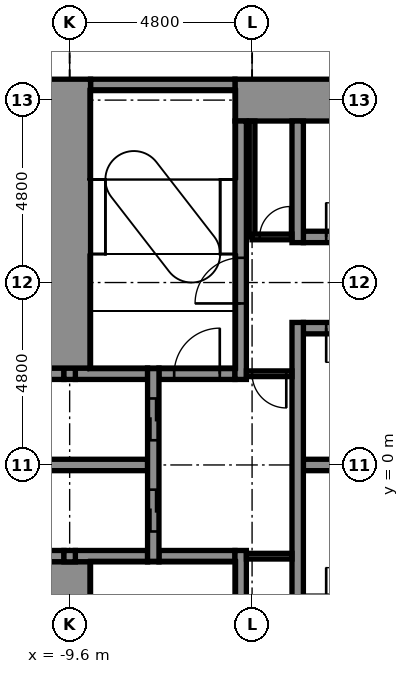
"""IFC4 building model, lengths in metres.
Left out: names, types, materials, properties, quantities, classifications, styles, units other than length and angle.
Written with IfcOpenShell. Run it as: python <this file> out.ifc"""

import sys

from ifc_helpers import new_model, si_unit, direction, frame, frame_2d, origin, place, context, subcontext, project, spatial, rectangle, extrude, element, fill, save


model = new_model("IFC4")
c1 = context("Model", 3, precision=1e-05, world=origin(), true_north=direction((0.0, 1.0)))
c2 = subcontext(c1, "Body", "Model", "MODEL_VIEW")
j1 = project(units=[si_unit("LENGTHUNIT", "METRE"), si_unit("PLANEANGLEUNIT", "RADIAN")], contexts=[c1])
p1 = place(None, origin())
s1 = spatial("IfcSite", under=j1, at=p1, CompositionType="ELEMENT")
p2 = place(p1, origin())
s2 = spatial("IfcBuilding", under=s1, at=p2, CompositionType="ELEMENT")
p3 = place(p2, frame((0.0, 0.0, 12.4)))
s3 = spatial("IfcBuildingStorey", under=s2, at=p3, CompositionType="ELEMENT", Elevation=12.4)
p4 = place(p3, frame((-10.85, -2.4, -0.3), z_axis=(0.0, 0.0, 1.0), x_axis=(1.0, 0.0, 0.0)))
e1 = element("IfcWall", 1, at=p4, inside=s3, PredefinedType="STANDARD", context=c2, shape_type="SweptSolid", body=[
    extrude(rectangle(XDim=1.1, YDim=0.3, at=frame_2d((0.55, 0.0))), origin(), (0.0, 0.0, 1.0), 5.05),
])
p5 = place(p3, frame((-9.45, -2.4, -0.3), z_axis=(0.0, 0.0, 1.0), x_axis=(1.0, 0.0, 0.0)))
e2 = element("IfcWall", 2, at=p5, inside=s3, PredefinedType="STANDARD", context=c2, shape_type="SweptSolid", body=[
    extrude(rectangle(XDim=1.9, YDim=0.3, at=frame_2d((0.95, 0.0))), origin(), (0.0, 0.0, 1.0), 5.05),
])
p6 = place(p3, frame((-7.25, -2.4, -0.3), z_axis=(0.0, 0.0, 1.0), x_axis=(1.0, 0.0, 0.0)))
e3 = element("IfcWall", 3, at=p6, inside=s3, PredefinedType="STANDARD", context=c2, shape_type="SweptSolid", body=[
    extrude(rectangle(XDim=2.0, YDim=0.3, at=frame_2d((1.0, 0.0))), origin(), (0.0, 0.0, 1.0), 5.05),
])
p7 = place(p3, frame((-10.85, 0.0, -0.3), z_axis=(0.0, 0.0, 1.0), x_axis=(1.0, 0.0, 0.0)))
e4 = element("IfcWall", 4, at=p7, inside=s3, PredefinedType="STANDARD", context=c2, shape_type="SweptSolid", body=[
    extrude(rectangle(XDim=3.3, YDim=0.3, at=frame_2d((1.65, 0.0))), origin(), (0.0, 0.0, 1.0), 5.05),
])
p8 = place(p3, frame((-3.45, 0.0, -0.3), z_axis=(0.0, 0.0, 1.0), x_axis=(1.0, 0.0, 0.0)))
e5 = element("IfcWall", 5, at=p8, inside=s3, PredefinedType="STANDARD", context=c2, shape_type="SweptSolid", body=[
    extrude(rectangle(XDim=2.1, YDim=0.3, at=frame_2d((1.05, 0.0))), origin(), (0.0, 0.0, 1.0), 5.05),
])
p9 = place(p3, frame((-10.85, 2.4, -0.3), z_axis=(0.0, 0.0, 1.0), x_axis=(1.0, 0.0, 0.0)))
e6 = element("IfcWall", 6, at=p9, inside=s3, PredefinedType="STANDARD", context=c2, shape_type="SweptSolid", body=[
    extrude(rectangle(XDim=1.1, YDim=0.3, at=frame_2d((0.55, 0.0))), origin(), (0.0, 0.0, 1.0), 5.05),
])
p10 = place(p3, frame((-9.45, 2.4, -0.3), z_axis=(0.0, 0.0, 1.0), x_axis=(1.0, 0.0, 0.0)))
e7 = element("IfcWall", 7, at=p10, inside=s3, PredefinedType="STANDARD", context=c2, shape_type="SweptSolid", body=[
    extrude(rectangle(XDim=1.9, YDim=0.3, at=frame_2d((0.95, 0.0))), origin(), (0.0, 0.0, 1.0), 5.05),
])
p11 = place(p3, frame((-7.25, 2.4, -0.3), z_axis=(0.0, 0.0, 1.0), x_axis=(1.0, 0.0, 0.0)))
e8 = element("IfcWall", 8, at=p11, inside=s3, PredefinedType="STANDARD", context=c2, shape_type="SweptSolid", body=[
    extrude(rectangle(XDim=2.0, YDim=0.3, at=frame_2d((1.0, 0.0))), origin(), (0.0, 0.0, 1.0), 5.05),
])
p12 = place(p11, frame((0.4, 0.0, 0.3)))
e9 = element("IfcOpeningElement", 9, at=p12, cuts=e8, PredefinedType="OPENING", context=c2, shape_type="SweptSolid", body=[
    extrude(rectangle(XDim=1.2, YDim=2.1, at=frame_2d((0.6, 1.05))), frame((0.0, 0.16, 0.0), z_axis=(0.0, -1.0, 0.0), x_axis=(1.0, 0.0, 0.0)), (0.0, 0.0, 1.0), 0.32),
])
p13 = place(p3, frame((-3.45, 3.6, -0.3), z_axis=(0.0, 0.0, 1.0), x_axis=(1.0, 0.0, 0.0)))
e10 = element("IfcWall", 10, at=p13, inside=s3, PredefinedType="STANDARD", context=c2, shape_type="SweptSolid", body=[
    extrude(rectangle(XDim=2.1, YDim=0.3, at=frame_2d((1.05, 0.0))), origin(), (0.0, 0.0, 1.0), 5.05),
])
p14 = place(p13, frame((0.6, 0.0, 0.3)))
e11 = element("IfcOpeningElement", 11, at=p14, cuts=e10, PredefinedType="OPENING", context=c2, shape_type="SweptSolid", body=[
    extrude(rectangle(XDim=0.9, YDim=2.1, at=frame_2d((0.45, 1.05))), frame((0.0, 0.16, 0.0), z_axis=(0.0, -1.0, 0.0), x_axis=(1.0, 0.0, 0.0)), (0.0, 0.0, 1.0), 0.32),
])
p15 = place(p3, frame((-3.45, 6.0, -0.3), z_axis=(0.0, 0.0, 1.0), x_axis=(1.0, 0.0, 0.0)))
e12 = element("IfcWall", 12, at=p15, inside=s3, PredefinedType="STANDARD", context=c2, shape_type="SweptSolid", body=[
    extrude(rectangle(XDim=2.1, YDim=0.3, at=frame_2d((1.05, 0.0))), origin(), (0.0, 0.0, 1.0), 5.05),
])
p16 = place(p15, frame((0.6, 0.0, 0.3)))
e13 = element("IfcOpeningElement", 13, at=p16, cuts=e12, PredefinedType="OPENING", context=c2, shape_type="SweptSolid", body=[
    extrude(rectangle(XDim=0.9, YDim=2.1, at=frame_2d((0.45, 1.05))), frame((0.0, 0.16, 0.0), z_axis=(0.0, -1.0, 0.0), x_axis=(1.0, 0.0, 0.0)), (0.0, 0.0, 1.0), 0.32),
])
p17 = place(p3, frame((-5.25, 9.6, -0.3), z_axis=(0.0, 0.0, 1.0), x_axis=(1.0, 0.0, 0.0)))
e14 = element("IfcWall", 14, at=p17, inside=s3, PredefinedType="SHEAR", context=c2, shape_type="SweptSolid", body=[
    extrude(rectangle(XDim=14.3, YDim=1.1, at=frame_2d((7.15, 0.0))), origin(), (0.0, 0.0, 1.0), 5.05),
])
p18 = place(p17, frame((9.35, 0.0, 0.3)))
e15 = element("IfcOpeningElement", 15, at=p18, cuts=e14, PredefinedType="OPENING", context=c2, shape_type="SweptSolid", body=[
    extrude(rectangle(XDim=1.4, YDim=2.1, at=frame_2d((0.7, 1.05))), frame((0.0, 0.56, 0.0), z_axis=(0.0, -1.0, 0.0), x_axis=(1.0, 0.0, 0.0)), (0.0, 0.0, 1.0), 1.12),
])
p19 = place(p3, frame((-9.05, 10.0, -0.3), z_axis=(0.0, 0.0, 1.0), x_axis=(1.0, 0.0, 0.0)))
e16 = element("IfcWall", 16, at=p19, inside=s3, PredefinedType="STANDARD", context=c2, shape_type="SweptSolid", body=[
    extrude(rectangle(XDim=3.8, YDim=0.3, at=frame_2d((1.9, 0.0))), origin(), (0.0, 0.0, 1.0), 5.05),
])
p20 = place(p3, frame((-9.6, -10.15, -0.3), z_axis=(0.0, 0.0, 1.0), x_axis=(0.0, 1.0, 0.0)))
e17 = element("IfcWall", 17, at=p20, inside=s3, PredefinedType="SHEAR", context=c2, shape_type="SweptSolid", body=[
    extrude(rectangle(XDim=7.6, YDim=1.1, at=frame_2d((3.8, 0.0))), origin(), (0.0, 0.0, 1.0), 5.05),
])
for number, where, z_axis, x_axis in (
    (18, (-9.6, -2.55, -0.3), (0.0, 0.0, 1.0), (0.0, 1.0, 0.0)),
    (19, (-9.6, 2.25, -0.3), (0.0, 0.0, 1.0), (0.0, 1.0, 0.0)),
):
    element("IfcWall", number, at=place(p3, frame(where, z_axis=z_axis, x_axis=x_axis)), inside=s3, PredefinedType="STANDARD", context=c2, shape_type="SweptSolid", body=[
        extrude(rectangle(XDim=0.3, YDim=0.3, at=frame_2d((0.15, 0.0))), origin(), (0.0, 0.0, 1.0), 5.05),
    ])
p21 = place(p3, frame((-9.6, 2.55, -0.3), z_axis=(0.0, 0.0, 1.0), x_axis=(0.0, 1.0, 0.0)))
e20 = element("IfcWall", 20, at=p21, inside=s3, PredefinedType="SHEAR", context=c2, shape_type="SweptSolid", body=[
    extrude(rectangle(XDim=7.6, YDim=1.1, at=frame_2d((3.8, 0.0))), origin(), (0.0, 0.0, 1.0), 5.05),
])
p22 = place(p3, frame((-7.4, -2.55, -0.3), z_axis=(0.0, 0.0, 1.0), x_axis=(0.0, 1.0, 0.0)))
e21 = element("IfcWall", 21, at=p22, inside=s3, PredefinedType="STANDARD", context=c2, shape_type="SweptSolid", body=[
    extrude(rectangle(XDim=5.1, YDim=0.3, at=frame_2d((2.55, 0.0))), origin(), (0.0, 0.0, 1.0), 5.05),
])
p23 = place(p22, frame((0.8, 0.0, 0.3)))
e22 = element("IfcOpeningElement", 22, at=p23, cuts=e21, PredefinedType="OPENING", context=c2, shape_type="SweptSolid", body=[
    extrude(rectangle(XDim=1.1, YDim=2.1, at=frame_2d((0.55, 1.05))), frame((0.0, 0.16, 0.0), z_axis=(0.0, -1.0, 0.0), x_axis=(1.0, 0.0, 0.0)), (0.0, 0.0, 1.0), 0.32),
])
p24 = place(p22, frame((3.2, 0.0, 0.3)))
e23 = element("IfcOpeningElement", 23, at=p24, cuts=e21, PredefinedType="OPENING", context=c2, shape_type="SweptSolid", body=[
    extrude(rectangle(XDim=1.1, YDim=2.1, at=frame_2d((0.55, 1.05))), frame((0.0, 0.16, 0.0), z_axis=(0.0, -1.0, 0.0), x_axis=(1.0, 0.0, 0.0)), (0.0, 0.0, 1.0), 0.32),
])
p25 = place(p3, frame((-5.1, -9.05, -0.3), z_axis=(0.0, 0.0, 1.0), x_axis=(0.0, 1.0, 0.0)))
e24 = element("IfcWall", 24, at=p25, inside=s3, PredefinedType="STANDARD", context=c2, shape_type="SweptSolid", body=[
    extrude(rectangle(XDim=6.8, YDim=0.3, at=frame_2d((3.4, 0.0))), origin(), (0.0, 0.0, 1.0), 5.05),
])
p26 = place(p25, frame((3.6, 0.0, 0.3)))
e25 = element("IfcOpeningElement", 25, at=p26, cuts=e24, PredefinedType="OPENING", context=c2, shape_type="SweptSolid", body=[
    extrude(rectangle(XDim=1.2, YDim=2.1, at=frame_2d((0.6, 1.05))), frame((0.0, 0.16, 0.0), z_axis=(0.0, -1.0, 0.0), x_axis=(1.0, 0.0, 0.0)), (0.0, 0.0, 1.0), 0.32),
])
p27 = place(p3, frame((-5.1, 2.25, -0.3), z_axis=(0.0, 0.0, 1.0), x_axis=(0.0, 1.0, 0.0)))
e26 = element("IfcWall", 26, at=p27, inside=s3, PredefinedType="STANDARD", context=c2, shape_type="SweptSolid", body=[
    extrude(rectangle(XDim=6.8, YDim=0.3, at=frame_2d((3.4, 0.0))), origin(), (0.0, 0.0, 1.0), 5.05),
])
p28 = place(p27, frame((2.0, 0.0, 0.3)))
e27 = element("IfcOpeningElement", 27, at=p28, cuts=e26, PredefinedType="OPENING", context=c2, shape_type="SweptSolid", body=[
    extrude(rectangle(XDim=1.2, YDim=2.1, at=frame_2d((0.6, 1.05))), frame((0.0, 0.16, 0.0), z_axis=(0.0, -1.0, 0.0), x_axis=(1.0, 0.0, 0.0)), (0.0, 0.0, 1.0), 0.32),
])
p29 = place(p3, frame((-3.6, -3.75, -0.3), z_axis=(0.0, 0.0, 1.0), x_axis=(0.0, 1.0, 0.0)))
e28 = element("IfcWall", 28, at=p29, inside=s3, PredefinedType="STANDARD", context=c2, shape_type="SweptSolid", body=[
    extrude(rectangle(XDim=7.5, YDim=0.3, at=frame_2d((3.75, 0.0))), origin(), (0.0, 0.0, 1.0), 5.05),
])
p30 = place(p3, frame((-3.6, 5.85, -0.3), z_axis=(0.0, 0.0, 1.0), x_axis=(0.0, 1.0, 0.0)))
e29 = element("IfcWall", 29, at=p30, inside=s3, PredefinedType="STANDARD", context=c2, shape_type="SweptSolid", body=[
    extrude(rectangle(XDim=3.2, YDim=0.3, at=frame_2d((1.6, 0.0))), origin(), (0.0, 0.0, 1.0), 5.05),
])
p31 = place(p3, frame((-4.8, 6.0, 0.0), z_axis=(0.0, 0.0, 1.0), x_axis=(0.0, 1.0, 0.0)))
e30 = element("IfcWall", 30, at=p31, inside=s3, PredefinedType="PARTITIONING", context=c2, shape_type="SweptSolid", body=[
    extrude(rectangle(XDim=3.05, YDim=0.15, at=frame_2d((1.525, 0.0))), origin(), (0.0, 0.0, 1.0), 4.7),
])
p32 = place(p3, frame((-4.8, 6.0, 0.0), z_axis=(0.0, 0.0, 1.0), x_axis=(1.0, 0.0, 0.0)))
e31 = element("IfcWall", 31, at=p32, inside=s3, PredefinedType="PARTITIONING", context=c2, shape_type="SweptSolid", body=[
    extrude(rectangle(XDim=1.05, YDim=0.15, at=frame_2d((0.525, 0.0))), origin(), (0.0, 0.0, 1.0), 4.7),
])
p33 = place(p32, frame((0.2, 0.0, 0.0)))
e32 = element("IfcOpeningElement", 32, at=p33, cuts=e31, PredefinedType="OPENING", context=c2, shape_type="SweptSolid", body=[
    extrude(rectangle(XDim=0.8, YDim=2.1, at=frame_2d((0.4, 1.05))), frame((0.0, 0.085, 0.0), z_axis=(0.0, -1.0, 0.0), x_axis=(1.0, 0.0, 0.0)), (0.0, 0.0, 1.0), 0.17),
])
p34 = place(p3, frame((-4.95, 2.4, 0.0), z_axis=(0.0, 0.0, 1.0), x_axis=(1.0, 0.0, 0.0)))
e33 = element("IfcWall", 33, at=p34, inside=s3, PredefinedType="PARTITIONING", context=c2, shape_type="SweptSolid", body=[
    extrude(rectangle(XDim=1.2, YDim=0.15, at=frame_2d((0.6, 0.0))), origin(), (0.0, 0.0, 1.0), 4.75),
])
p35 = place(p34, frame((0.15, 0.0, 0.0)))
e34 = element("IfcOpeningElement", 34, at=p35, cuts=e33, PredefinedType="OPENING", context=c2, shape_type="SweptSolid", body=[
    extrude(rectangle(XDim=0.9, YDim=2.1, at=frame_2d((0.45, 1.05))), frame((0.0, 0.085, 0.0), z_axis=(0.0, -1.0, 0.0), x_axis=(1.0, 0.0, 0.0)), (0.0, 0.0, 1.0), 0.17),
])
p36 = place(p3, frame((-4.95, -2.4, 0.0), z_axis=(0.0, 0.0, 1.0), x_axis=(1.0, 0.0, 0.0)))
e35 = element("IfcWall", 35, at=p36, inside=s3, PredefinedType="PARTITIONING", context=c2, shape_type="SweptSolid", body=[
    extrude(rectangle(XDim=1.2, YDim=0.15, at=frame_2d((0.6, 0.0))), origin(), (0.0, 0.0, 1.0), 4.75),
])
p37 = place(p33, origin())
e36 = element("IfcDoor", 36, at=p37, inside=s3, OperationType="SINGLE_SWING_RIGHT", PredefinedType="DOOR", context=c2, shape_type="SweptSolid", body=[
    extrude(rectangle(XDim=0.8, YDim=2.1, at=frame_2d((0.4, 1.05))), frame((0.0, 0.025, 0.0), z_axis=(0.0, -1.0, 0.0), x_axis=(1.0, 0.0, 0.0)), (0.0, 0.0, 1.0), 0.05),
])
fill(e32, e36)
p38 = place(p23, origin())
e37 = element("IfcDoor", 37, at=p38, inside=s3, OperationType="DOUBLE_DOOR_SLIDING", PredefinedType="DOOR", context=c2, shape_type="SweptSolid", body=[
    extrude(rectangle(XDim=1.1, YDim=2.1, at=frame_2d((0.55, 1.05))), frame((0.0, 0.025, 0.0), z_axis=(0.0, -1.0, 0.0), x_axis=(1.0, 0.0, 0.0)), (0.0, 0.0, 1.0), 0.05),
])
fill(e22, e37)
p39 = place(p24, origin())
e38 = element("IfcDoor", 38, at=p39, inside=s3, OperationType="DOUBLE_DOOR_SLIDING", PredefinedType="DOOR", context=c2, shape_type="SweptSolid", body=[
    extrude(rectangle(XDim=1.1, YDim=2.1, at=frame_2d((0.55, 1.05))), frame((0.0, 0.025, 0.0), z_axis=(0.0, -1.0, 0.0), x_axis=(1.0, 0.0, 0.0)), (0.0, 0.0, 1.0), 0.05),
])
fill(e23, e38)
p40 = place(p28, origin())
e39 = element("IfcDoor", 39, at=p40, inside=s3, OperationType="SINGLE_SWING_LEFT", PredefinedType="DOOR", context=c2, shape_type="SweptSolid", body=[
    extrude(rectangle(XDim=1.2, YDim=2.1, at=frame_2d((0.6, 1.05))), frame((0.0, 0.025, 0.0), z_axis=(0.0, -1.0, 0.0), x_axis=(1.0, 0.0, 0.0)), (0.0, 0.0, 1.0), 0.05),
])
fill(e27, e39)
p41 = place(p16, origin())
e40 = element("IfcDoor", 40, at=p41, inside=s3, OperationType="SINGLE_SWING_LEFT", PredefinedType="DOOR", context=c2, shape_type="SweptSolid", body=[
    extrude(rectangle(XDim=0.9, YDim=2.1, at=frame_2d((0.45, 1.05))), frame((0.0, 0.025, 0.0), z_axis=(0.0, -1.0, 0.0), x_axis=(1.0, 0.0, 0.0)), (0.0, 0.0, 1.0), 0.05),
])
fill(e13, e40)
p42 = place(p14, frame((0.9, 0.0, 0.0), z_axis=(0.0, 0.0, 1.0), x_axis=(-1.0, 0.0, 0.0)))
e41 = element("IfcDoor", 41, at=p42, inside=s3, OperationType="SINGLE_SWING_LEFT", PredefinedType="DOOR", context=c2, shape_type="SweptSolid", body=[
    extrude(rectangle(XDim=0.9, YDim=2.1, at=frame_2d((0.45, 1.05))), frame((0.0, 0.025, 0.0), z_axis=(0.0, -1.0, 0.0), x_axis=(1.0, 0.0, 0.0)), (0.0, 0.0, 1.0), 0.05),
])
fill(e11, e41)
p43 = place(p35, frame((0.9, 0.0, 0.0), z_axis=(0.0, 0.0, 1.0), x_axis=(-1.0, 0.0, 0.0)))
e42 = element("IfcDoor", 42, at=p43, inside=s3, OperationType="SINGLE_SWING_RIGHT", PredefinedType="DOOR", context=c2, shape_type="SweptSolid", body=[
    extrude(rectangle(XDim=0.9, YDim=2.1, at=frame_2d((0.45, 1.05))), frame((0.0, 0.025, 0.0), z_axis=(0.0, -1.0, 0.0), x_axis=(1.0, 0.0, 0.0)), (0.0, 0.0, 1.0), 0.05),
])
fill(e34, e42)
p44 = place(p12, origin())
e43 = element("IfcDoor", 43, at=p44, inside=s3, OperationType="SINGLE_SWING_RIGHT", PredefinedType="DOOR", context=c2, shape_type="SweptSolid", body=[
    extrude(rectangle(XDim=1.2, YDim=2.1, at=frame_2d((0.6, 1.05))), frame((0.0, 0.025, 0.0), z_axis=(0.0, -1.0, 0.0), x_axis=(1.0, 0.0, 0.0)), (0.0, 0.0, 1.0), 0.05),
])
fill(e9, e43)
save(model, sys.argv[1])
